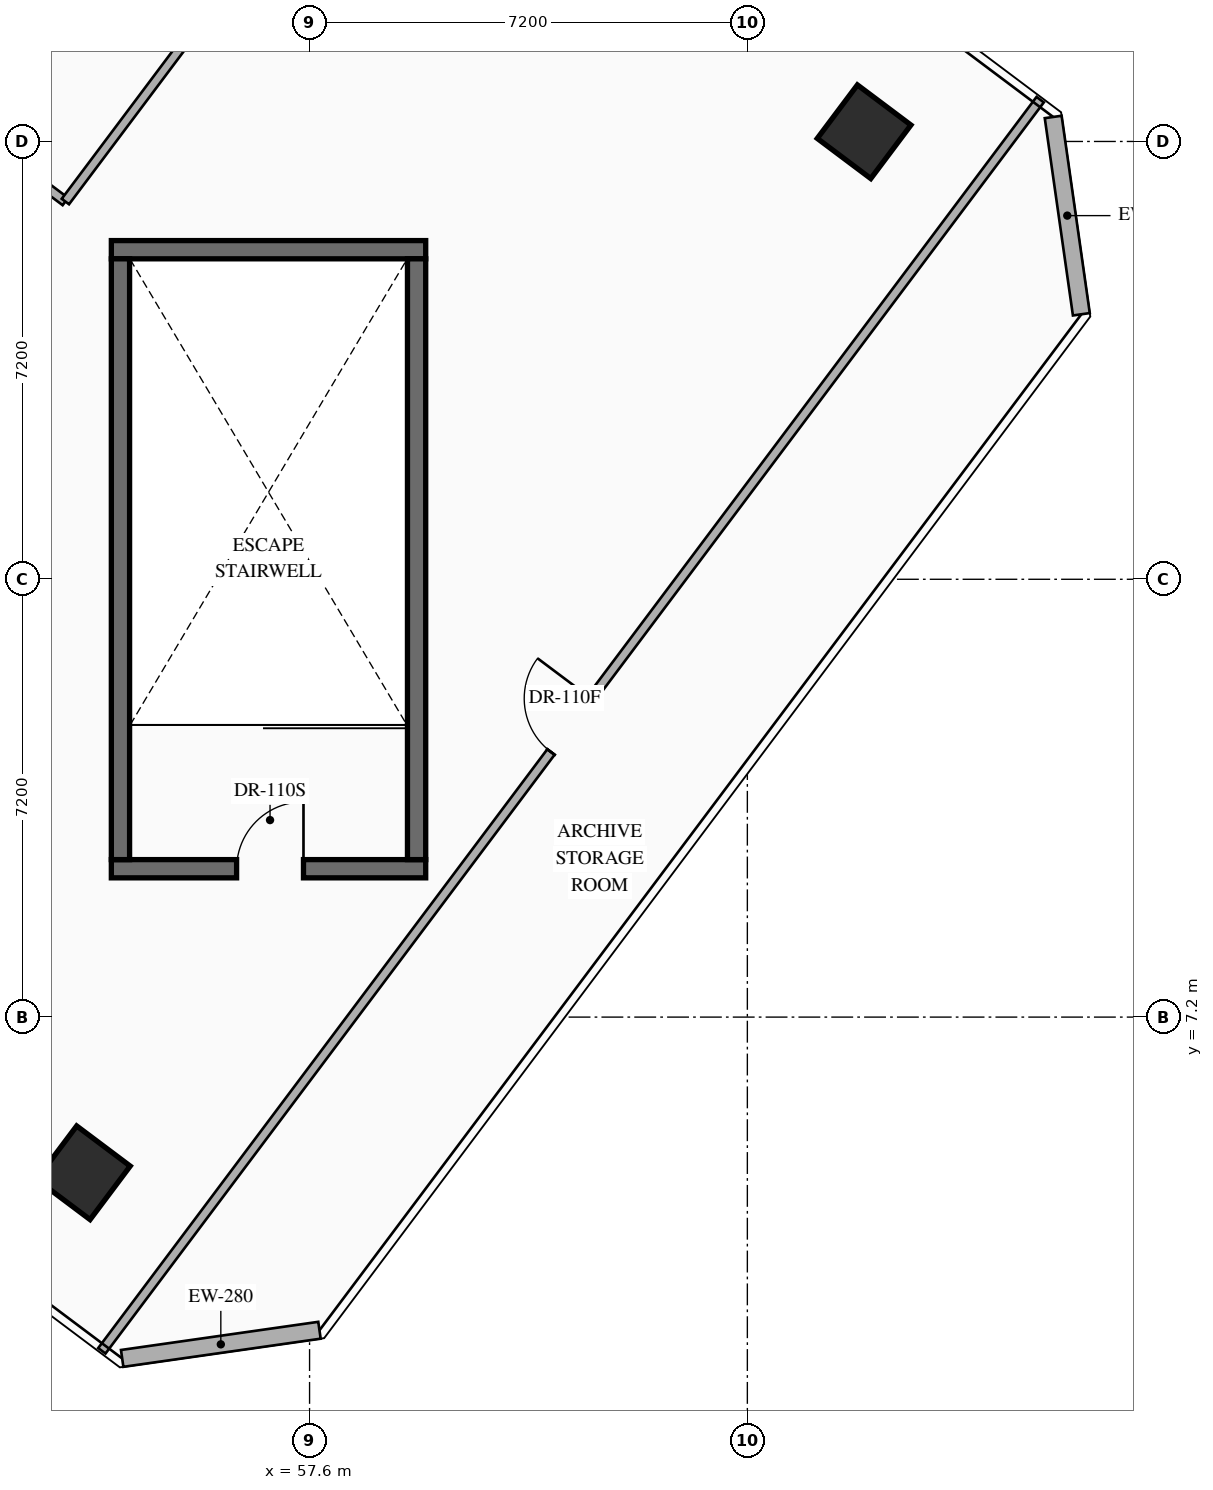
"""IFC4 building model, lengths in metres.
Left out: names, types, materials, properties, quantities, classifications, styles, units other than length and angle.
Written with IfcOpenShell. Run it as: python <this file> out.ifc"""

import sys

from ifc_helpers import new_model, si_unit, direction, frame, frame_2d, origin, origin_2d, place, context, subcontext, project, spatial, rectangle, hollow_rectangle, extrude, element, fill, save


model = new_model("IFC4")
c1 = context("Model", 3, precision=1e-05, world=origin(), true_north=direction((0.0, 1.0)))
c2 = subcontext(c1, "Body", "Model", "MODEL_VIEW")
j1 = project(units=[si_unit("LENGTHUNIT", "METRE"), si_unit("PLANEANGLEUNIT", "RADIAN")], contexts=[c1])
p1 = place(None, origin())
s1 = spatial("IfcSite", under=j1, at=p1, CompositionType="ELEMENT")
p2 = place(p1, origin())
s2 = spatial("IfcBuilding", under=s1, at=p2, CompositionType="ELEMENT")
p3 = place(p2, frame((0.0, 0.0, 21.6)))
s3 = spatial("IfcBuildingStorey", under=s2, at=p3, CompositionType="ELEMENT", Elevation=21.6)
p4 = place(p3, frame((54.34, 9.64, 0.0), z_axis=(0.0, 0.0, 1.0), x_axis=(1.0, 0.0, 0.0)))
e1 = element("IfcWall", 1, at=p4, inside=s3, PredefinedType="SHEAR", context=c2, shape_type="SweptSolid", body=[
    extrude(rectangle(XDim=5.17, YDim=0.3, at=frame_2d((2.585, 0.0))), origin(), (0.0, 0.0, 1.0), 5.1),
])
p5 = place(p4, frame((2.06, 0.0, 0.0)))
e2 = element("IfcOpeningElement", 2, at=p5, cuts=e1, PredefinedType="OPENING", context=c2, shape_type="SweptSolid", body=[
    extrude(rectangle(XDim=1.1, YDim=2.2, at=frame_2d((0.55, 1.1))), frame((0.0, 0.16, 0.0), z_axis=(0.0, -1.0, 0.0), x_axis=(1.0, 0.0, 0.0)), (0.0, 0.0, 1.0), 0.32),
])
p6 = place(p3, frame((54.34, 19.82, 0.0), z_axis=(0.0, 0.0, 1.0), x_axis=(1.0, 0.0, 0.0)))
e3 = element("IfcWall", 3, at=p6, inside=s3, PredefinedType="SHEAR", context=c2, shape_type="SweptSolid", body=[
    extrude(rectangle(XDim=5.17, YDim=0.3, at=frame_2d((2.585, 0.0))), origin(), (0.0, 0.0, 1.0), 5.1),
])
for number, where, z_axis, x_axis in (
    (4, (54.49, 9.79, 0.0), (0.0, 0.0, 1.0), (0.0, 1.0, 0.0)),
    (5, (59.36, 9.79, 0.0), (0.0, 0.0, 1.0), (0.0, 1.0, 0.0)),
):
    element("IfcWall", number, at=place(p3, frame(where, z_axis=z_axis, x_axis=x_axis)), inside=s3, PredefinedType="SHEAR", context=c2, shape_type="SweptSolid", body=[
        extrude(rectangle(XDim=9.88, YDim=0.3, at=frame_2d((4.94, 0.0))), origin(), (0.0, 0.0, 1.0), 5.1),
    ])
for number, where, z_axis, x_axis in (
    (6, (53.88, 4.64, 0.0), (0.0, 0.0, 1.0), (0.8, -0.6, 0.0)),
    (7, (66.72, 21.76, 0.0), (0.0, 0.0, 1.0), (0.8, -0.6, 0.0)),
):
    element("IfcColumn", number, at=place(p3, frame(where, z_axis=z_axis, x_axis=x_axis)), inside=s3, PredefinedType="COLUMN", context=c2, shape_type="SweptSolid", body=[
        extrude(hollow_rectangle(XDim=1.1, YDim=1.1, WallThickness=0.04, at=origin_2d()), origin(), (0.0, 0.0, 1.0), 5.4),
    ])
for number, where, z_axis, x_axis in (
    (8, (69.83, 22.003, 0.0), (0.0, 0.0, 1.0), (0.141, -0.99, 0.0)),
    (9, (57.763, 2.05, 0.0), (0.0, 0.0, 1.0), (-0.99, -0.141, 0.0)),
):
    element("IfcWall", number, at=place(p3, frame(where, z_axis=z_axis, x_axis=x_axis)), inside=s3, PredefinedType="STANDARD", context=c2, shape_type="SweptSolid", body=[
        extrude(rectangle(XDim=3.278, YDim=0.28, at=frame_2d((1.639, 0.0))), origin(), (0.0, 0.0, 1.0), 5.1),
    ])
p7 = place(p3, frame((48.64, 24.32, 0.0), z_axis=(0.0, 0.0, 1.0), x_axis=(0.80000474051, -0.599993679268, 0.0)))
e10 = element("IfcWall", 10, at=p7, inside=s3, PredefinedType="PARTITIONING", context=c2, shape_type="SweptSolid", body=[
    extrude(rectangle(XDim=6.18, YDim=0.15, at=frame_2d((3.09, 0.0))), origin(), (0.0, 0.0, 1.0), 5.1),
])
p8 = place(p7, frame((2.54, 0.0, 0.0)))
e11 = element("IfcOpeningElement", 11, at=p8, cuts=e10, PredefinedType="OPENING", context=c2, shape_type="SweptSolid", body=[
    extrude(rectangle(XDim=1.1, YDim=2.16, at=frame_2d((0.55, 1.08))), frame((0.0, 0.085, 0.0), z_axis=(0.0, -1.0, 0.0), x_axis=(1.0, 0.0, 0.0)), (0.0, 0.0, 1.0), 0.17),
])
p9 = place(p3, frame((53.584, 20.612, 0.0), z_axis=(0.0, 0.0, 1.0), x_axis=(0.600003564151, 0.799997326874, 0.0)))
e12 = element("IfcWall", 12, at=p9, inside=s3, PredefinedType="PARTITIONING", context=c2, shape_type="SweptSolid", body=[
    extrude(rectangle(XDim=10.96, YDim=0.15, at=frame_2d((5.48, 0.0))), origin(), (0.0, 0.0, 1.0), 5.1),
])
p10 = place(p3, frame((54.184, 1.712, 0.0), z_axis=(0.0, 0.0, 1.0), x_axis=(0.59999392496, 0.800004556244, 0.0)))
e13 = element("IfcWall", 13, at=p10, inside=s3, PredefinedType="PARTITIONING", context=c2, shape_type="SweptSolid", body=[
    extrude(rectangle(XDim=25.72, YDim=0.15, at=frame_2d((12.86, 0.0))), origin(), (0.0, 0.0, 1.0), 5.1),
])
p11 = place(p10, frame((12.31, 0.0, 0.0)))
e14 = element("IfcOpeningElement", 14, at=p11, cuts=e13, PredefinedType="OPENING", context=c2, shape_type="SweptSolid", body=[
    extrude(rectangle(XDim=1.1, YDim=2.24, at=frame_2d((0.55, 1.12))), frame((0.0, 0.085, 0.0), z_axis=(0.0, -1.0, 0.0), x_axis=(1.0, 0.0, 0.0)), (0.0, 0.0, 1.0), 0.17),
])
p12 = place(p5, origin())
e15 = element("IfcDoor", 15, at=p12, inside=s3, OperationType="SINGLE_SWING_RIGHT", PredefinedType="DOOR", context=c2, shape_type="SweptSolid", body=[
    extrude(rectangle(XDim=1.1, YDim=2.2, at=frame_2d((0.55, 1.1))), frame((0.0, 0.025, 0.0), z_axis=(0.0, -1.0, 0.0), x_axis=(1.0, 0.0, 0.0)), (0.0, 0.0, 1.0), 0.05),
])
fill(e2, e15)
p13 = place(p11, origin())
e16 = element("IfcDoor", 16, at=p13, inside=s3, OperationType="SINGLE_SWING_RIGHT", PredefinedType="DOOR", context=c2, shape_type="SweptSolid", body=[
    extrude(rectangle(XDim=1.1, YDim=2.24, at=frame_2d((0.55, 1.12))), frame((0.0, 0.025, 0.0), z_axis=(0.0, -1.0, 0.0), x_axis=(1.0, 0.0, 0.0)), (0.0, 0.0, 1.0), 0.05),
])
fill(e14, e16)
save(model, sys.argv[1])
